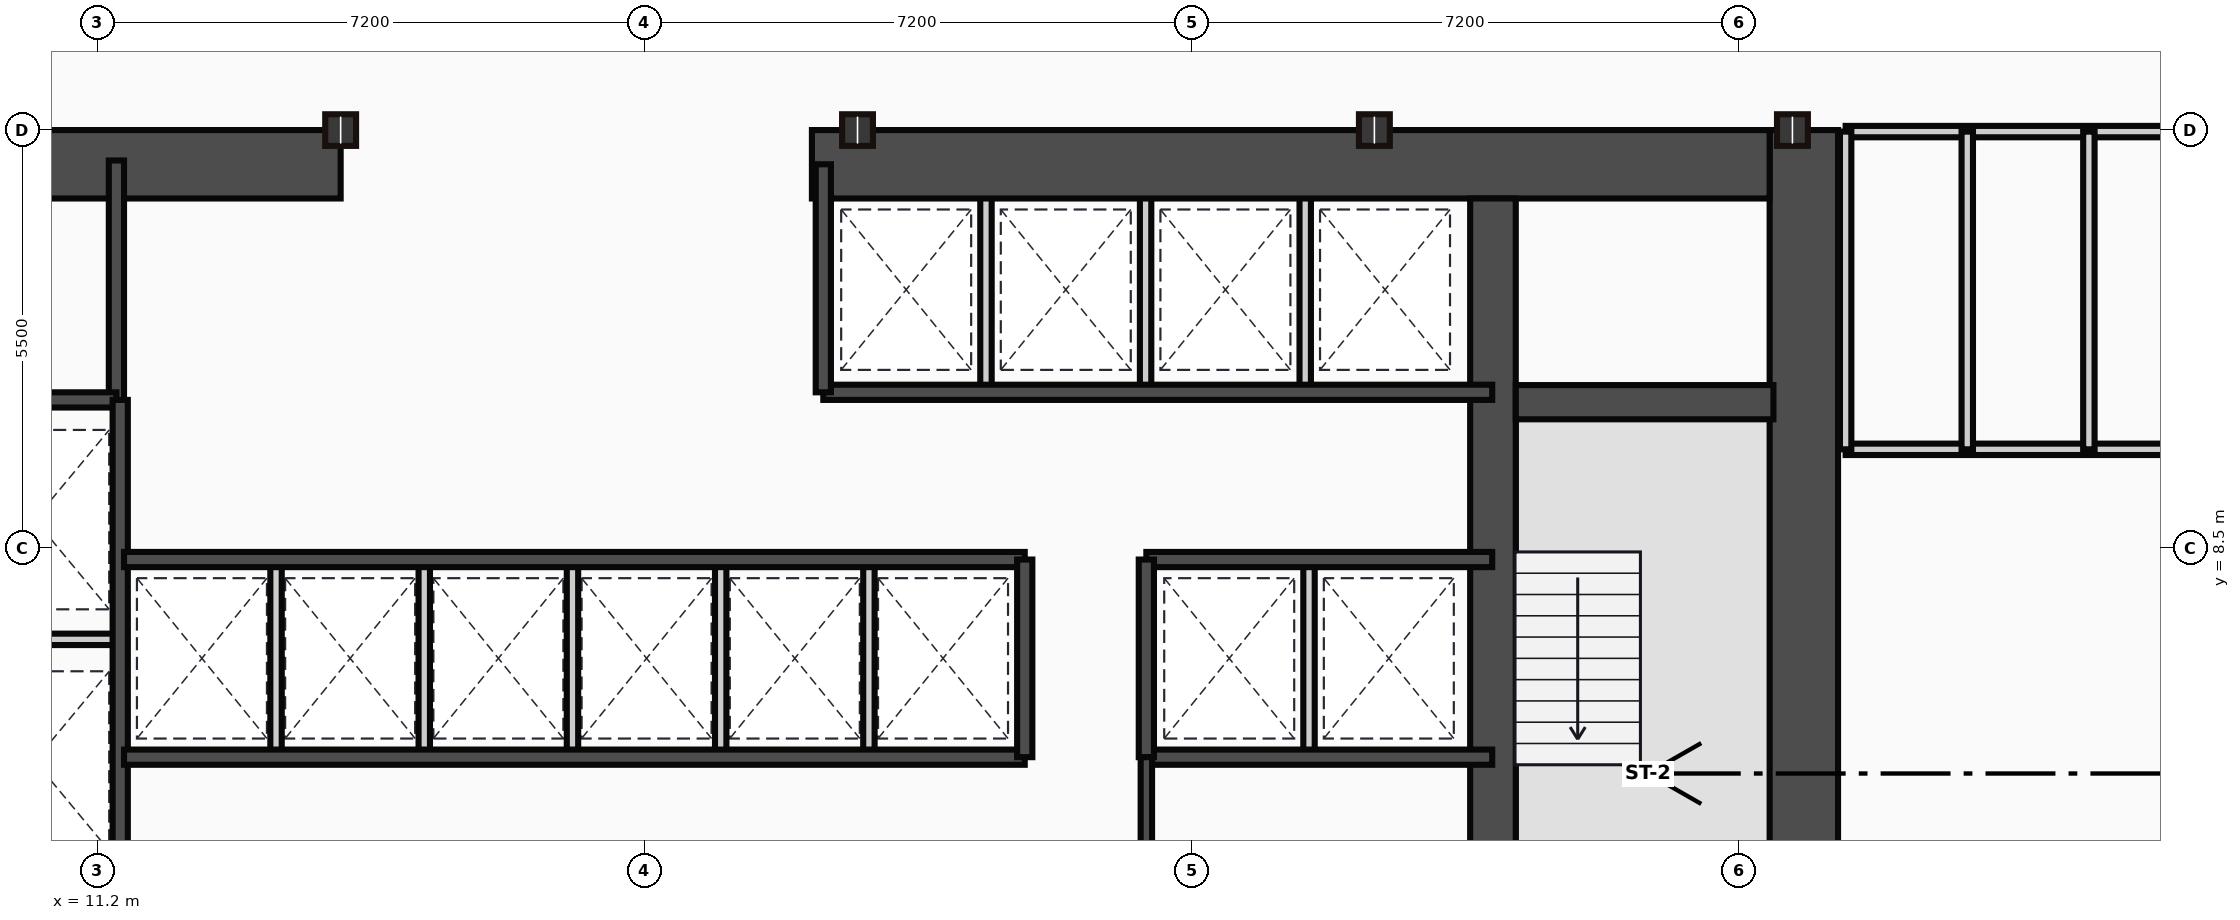
"""IFC4 building model, lengths in metres.
Left out: names, types, materials, properties, quantities, classifications, styles, units other than length and angle.
Written with IfcOpenShell. Run it as: python <this file> out.ifc"""

import sys

from ifc_helpers import new_model, si_unit, direction, frame, frame_2d, origin, origin_2d, place, context, subcontext, project, spatial, rectangle, i_section, extrude, source, transform, mapped, element, fill, save


model = new_model("IFC4")
c1 = context("Model", 3, precision=1e-05, world=origin(), true_north=direction((0.0, 1.0)))
c2 = subcontext(c1, "Body", "Model", "MODEL_VIEW")
j1 = project(units=[si_unit("LENGTHUNIT", "METRE"), si_unit("PLANEANGLEUNIT", "RADIAN")], contexts=[c1])
p1 = place(None, origin())
s1 = spatial("IfcSite", under=j1, at=p1, CompositionType="ELEMENT")
p2 = place(p1, origin())
s2 = spatial("IfcBuilding", under=s1, at=p2, CompositionType="ELEMENT")
p3 = place(p2, frame((0.0, 0.0, 32.5)))
s3 = spatial("IfcBuildingStorey", under=s2, at=p3, CompositionType="ELEMENT", Elevation=32.5)
m1 = source(origin(), c2, "Body", "SweptSolid", [
    extrude(rectangle(XDim=13.1, YDim=0.9, at=frame_2d((6.55, 0.0))), origin(), (0.0, 0.0, 1.0), 3.65),
])
p4 = place(p3, frame((33.65, 0.9, 0.0), z_axis=(0.0, 0.0, 1.0), x_axis=(0.0, 1.0, 0.0)))
e1 = element("IfcWall", 1, at=p4, inside=s3, PredefinedType="SHEAR", context=c2, shape_type="MappedRepresentation", body=[
    mapped(m1, transform((0.0, 0.0, 0.0))),
])
m2 = source(origin(), c2, "Body", "SweptSolid", [
    extrude(rectangle(XDim=9.1, YDim=0.9, at=frame_2d((4.55, 0.0))), origin(), (0.0, 0.0, 1.0), 3.65),
])
p5 = place(p3, frame((5.3, 13.55, 0.0), z_axis=(0.0, 0.0, 1.0), x_axis=(1.0, 0.0, 0.0)))
e2 = element("IfcWall", 2, at=p5, inside=s3, PredefinedType="SHEAR", context=c2, shape_type="MappedRepresentation", body=[
    mapped(m2, transform((0.0, 0.0, 0.0))),
])
p6 = place(p5, frame((4.1, 0.0, 0.0)))
e3 = element("IfcOpeningElement", 3, at=p6, cuts=e2, PredefinedType="OPENING", context=c2, shape_type="SweptSolid", body=[
    extrude(rectangle(XDim=1.1, YDim=2.15, at=frame_2d((0.55, 1.075))), frame((0.0, 0.46, 0.0), z_axis=(0.0, -1.0, 0.0), x_axis=(1.0, 0.0, 0.0)), (0.0, 0.0, 1.0), 0.92),
])
m3 = source(origin(), c2, "Body", "SweptSolid", [
    extrude(rectangle(XDim=12.6, YDim=0.9, at=frame_2d((6.3, 0.0))), origin(), (0.0, 0.0, 1.0), 3.65),
])
p7 = place(p3, frame((20.6, 13.55, 0.0), z_axis=(0.0, 0.0, 1.0), x_axis=(1.0, 0.0, 0.0)))
e4 = element("IfcWall", 4, at=p7, inside=s3, PredefinedType="SHEAR", context=c2, shape_type="MappedRepresentation", body=[
    mapped(m3, transform((0.0, 0.0, 0.0))),
])
p8 = place(p7, frame((9.25, 0.0, 0.0)))
e5 = element("IfcOpeningElement", 5, at=p8, cuts=e4, PredefinedType="OPENING", context=c2, shape_type="SweptSolid", body=[
    extrude(rectangle(XDim=1.1, YDim=2.15, at=frame_2d((0.55, 1.075))), frame((0.0, 0.46, 0.0), z_axis=(0.0, -1.0, 0.0), x_axis=(1.0, 0.0, 0.0)), (0.0, 0.0, 1.0), 0.92),
])
m4 = source(origin(), c2, "Body", "SweptSolid", [
    extrude(rectangle(XDim=12.2, YDim=0.6, at=frame_2d((6.1, 0.0))), origin(), (0.0, 0.0, 1.0), 3.65),
])
p9 = place(p3, frame((29.56, 0.9, 0.0), z_axis=(0.0, 0.0, 1.0), x_axis=(0.0, 1.0, 0.0)))
e6 = element("IfcWall", 6, at=p9, inside=s3, PredefinedType="SHEAR", context=c2, shape_type="MappedRepresentation", body=[
    mapped(m4, transform((0.0, 0.0, 0.0))),
])
m5 = source(origin(), c2, "Body", "SweptSolid", [
    extrude(rectangle(XDim=3.39, YDim=0.45, at=frame_2d((1.695, 0.0))), origin(), (0.0, 0.0, 1.0), 3.65),
])
p10 = place(p3, frame((29.86, 10.42, 0.0), z_axis=(0.0, 0.0, 1.0), x_axis=(1.0, 0.0, 0.0)))
e7 = element("IfcWall", 7, at=p10, inside=s3, PredefinedType="SHEAR", context=c2, shape_type="MappedRepresentation", body=[
    mapped(m5, transform((0.0, 0.0, 0.0))),
])
p11 = place(p10, frame((1.1, 0.0, 0.0)))
e8 = element("IfcOpeningElement", 8, at=p11, cuts=e7, PredefinedType="OPENING", context=c2, shape_type="SweptSolid", body=[
    extrude(rectangle(XDim=1.1, YDim=2.15, at=frame_2d((0.55, 1.075))), frame((0.0, 0.235, 0.0), z_axis=(0.0, -1.0, 0.0), x_axis=(1.0, 0.0, 0.0)), (0.0, 0.0, 1.0), 0.47),
])
m6 = source(origin(), c2, "Body", "SweptSolid", [
    extrude(i_section(OverallWidth=0.406, OverallDepth=0.416, WebThickness=0.03, FlangeThickness=0.048, at=origin_2d()), origin(), (0.0, 0.0, 1.0), 3.65),
])
for number, where, z_axis, x_axis in (
    (9, (14.4, 14.0, 0.0), (0.0, 0.0, 1.0), (1.0, 0.0, 0.0)),
    (10, (21.2, 14.0, 0.0), (0.0, 0.0, 1.0), (1.0, 0.0, 0.0)),
    (11, (28.0, 14.0, 0.0), (0.0, 0.0, 1.0), (1.0, 0.0, 0.0)),
    (12, (33.5, 14.0, 0.0), (0.0, 0.0, 1.0), (1.0, 0.0, 0.0)),
):
    element("IfcColumn", number, at=place(p3, frame(where, z_axis=z_axis, x_axis=x_axis)), inside=s3, PredefinedType="COLUMN", context=c2, shape_type="MappedRepresentation", body=[
        mapped(m6, transform((0.0, 0.0, 0.0))),
    ])
m7 = source(origin(), c2, "Body", "SweptSolid", [
    extrude(rectangle(XDim=3.18, YDim=0.2, at=frame_2d((1.59, 0.0))), origin(), (0.0, 0.0, 1.0), 3.4),
])
p12 = place(p3, frame((11.45, 10.42, 0.0), z_axis=(0.0, 0.0, 1.0), x_axis=(0.0, 1.0, 0.0)))
e13 = element("IfcWall", 13, at=p12, inside=s3, PredefinedType="PARTITIONING", context=c2, shape_type="MappedRepresentation", body=[
    mapped(m7, transform((0.0, 0.0, 0.0))),
])
m8 = source(origin(), c2, "Body", "SweptSolid", [
    extrude(rectangle(XDim=2.35, YDim=0.2, at=frame_2d((1.175, 0.0))), origin(), (0.0, 0.0, 1.0), 3.4),
])
p13 = place(p3, frame((9.1, 10.45, 0.0), z_axis=(0.0, 0.0, 1.0), x_axis=(1.0, 0.0, 0.0)))
e14 = element("IfcWall", 14, at=p13, inside=s3, PredefinedType="PARTITIONING", context=c2, shape_type="MappedRepresentation", body=[
    mapped(m8, transform((0.0, 0.0, 0.0))),
])
p14 = place(p13, frame((0.55, 0.0, 0.0)))
e15 = element("IfcOpeningElement", 15, at=p14, cuts=e14, PredefinedType="OPENING", context=c2, shape_type="SweptSolid", body=[
    extrude(rectangle(XDim=1.1, YDim=2.15, at=frame_2d((0.55, 1.075))), frame((0.0, 0.11, 0.0), z_axis=(0.0, -1.0, 0.0), x_axis=(1.0, 0.0, 0.0)), (0.0, 0.0, 1.0), 0.22),
])
m9 = source(origin(), c2, "Body", "SweptSolid", [
    extrude(rectangle(XDim=9.6, YDim=0.2, at=frame_2d((4.8, 0.0))), origin(), (0.0, 0.0, 1.0), 3.4),
])
p15 = place(p3, frame((11.5, 0.85, 0.0), z_axis=(0.0, 0.0, 1.0), x_axis=(0.0, 1.0, 0.0)))
e16 = element("IfcWall", 16, at=p15, inside=s3, PredefinedType="PARTITIONING", context=c2, shape_type="MappedRepresentation", body=[
    mapped(m9, transform((0.0, 0.0, 0.0))),
])
p16 = place(p15, frame((4.2, 0.0, 0.0)))
e17 = element("IfcOpeningElement", 17, at=p16, cuts=e16, PredefinedType="OPENING", context=c2, shape_type="SweptSolid", body=[
    extrude(rectangle(XDim=1.1, YDim=2.15, at=frame_2d((0.55, 1.075))), frame((0.0, 0.11, 0.0), z_axis=(0.0, -1.0, 0.0), x_axis=(1.0, 0.0, 0.0)), (0.0, 0.0, 1.0), 0.22),
])
p17 = place(p15, frame((0.9, 0.0, 0.0)))
e18 = element("IfcOpeningElement", 18, at=p17, cuts=e16, PredefinedType="OPENING", context=c2, shape_type="SweptSolid", body=[
    extrude(rectangle(XDim=1.2, YDim=2.15, at=frame_2d((0.6, 1.075))), frame((0.0, 0.11, 0.0), z_axis=(0.0, -1.0, 0.0), x_axis=(1.0, 0.0, 0.0)), (0.0, 0.0, 1.0), 0.22),
])
m10 = source(origin(), c2, "Body", "SweptSolid", [
    extrude(rectangle(XDim=2.4, YDim=0.15, at=frame_2d((1.2, 0.0))), origin(), (0.0, 0.0, 1.0), 3.4),
])
p18 = place(p3, frame((9.1, 7.3, 0.0), z_axis=(0.0, 0.0, 1.0), x_axis=(1.0, 0.0, 0.0)))
e19 = element("IfcWall", 19, at=p18, inside=s3, PredefinedType="PARTITIONING", context=c2, shape_type="MappedRepresentation", body=[
    mapped(m10, transform((0.0, 0.0, 0.0))),
])
m11 = source(origin(), c2, "Body", "SweptSolid", [
    extrude(rectangle(XDim=11.85, YDim=0.2, at=frame_2d((5.925, 0.0))), origin(), (0.0, 0.0, 1.0), 3.4),
])
for number, where, z_axis, x_axis in (
    (20, (11.55, 5.75, 0.0), (0.0, 0.0, 1.0), (1.0, 0.0, 0.0)),
    (21, (11.55, 8.35, 0.0), (0.0, 0.0, 1.0), (1.0, 0.0, 0.0)),
):
    element("IfcWall", number, at=place(p3, frame(where, z_axis=z_axis, x_axis=x_axis)), inside=s3, PredefinedType="PARTITIONING", context=c2, shape_type="MappedRepresentation", body=[
        mapped(m11, transform((0.0, 0.0, 0.0))),
    ])
m12 = source(origin(), c2, "Body", "SweptSolid", [
    extrude(rectangle(XDim=2.6, YDim=0.2, at=frame_2d((1.3, 0.0))), origin(), (0.0, 0.0, 1.0), 3.4),
])
p19 = place(p3, frame((23.4, 5.75, 0.0), z_axis=(0.0, 0.0, 1.0), x_axis=(0.0, 1.0, 0.0)))
e22 = element("IfcWall", 22, at=p19, inside=s3, PredefinedType="PARTITIONING", context=c2, shape_type="MappedRepresentation", body=[
    mapped(m12, transform((0.0, 0.0, 0.0))),
])
m13 = source(origin(), c2, "Body", "SweptSolid", [
    extrude(rectangle(XDim=2.5, YDim=0.15, at=frame_2d((1.25, 0.0))), origin(), (0.0, 0.0, 1.0), 3.4),
])
for number, where, z_axis, x_axis in (
    (23, (13.55, 5.8, 0.0), (0.0, 0.0, 1.0), (0.0, 1.0, 0.0)),
    (24, (15.5, 5.8, 0.0), (0.0, 0.0, 1.0), (0.0, 1.0, 0.0)),
    (25, (17.45, 5.8, 0.0), (0.0, 0.0, 1.0), (0.0, 1.0, 0.0)),
    (26, (19.4, 5.8, 0.0), (0.0, 0.0, 1.0), (0.0, 1.0, 0.0)),
    (27, (21.35, 5.8, 0.0), (0.0, 0.0, 1.0), (0.0, 1.0, 0.0)),
):
    element("IfcWall", number, at=place(p3, frame(where, z_axis=z_axis, x_axis=x_axis)), inside=s3, PredefinedType="PARTITIONING", context=c2, shape_type="MappedRepresentation", body=[
        mapped(m13, transform((0.0, 0.0, 0.0))),
    ])
m14 = source(origin(), c2, "Body", "SweptSolid", [
    extrude(rectangle(XDim=8.8, YDim=0.2, at=frame_2d((4.4, 0.0))), origin(), (0.0, 0.0, 1.0), 3.4),
])
p20 = place(p3, frame((20.75, 10.55, 0.0), z_axis=(0.0, 0.0, 1.0), x_axis=(1.0, 0.0, 0.0)))
e28 = element("IfcWall", 28, at=p20, inside=s3, PredefinedType="PARTITIONING", context=c2, shape_type="MappedRepresentation", body=[
    mapped(m14, transform((0.0, 0.0, 0.0))),
])
m15 = source(origin(), c2, "Body", "SweptSolid", [
    extrude(rectangle(XDim=3.0, YDim=0.2, at=frame_2d((1.5, 0.0))), origin(), (0.0, 0.0, 1.0), 3.4),
])
p21 = place(p3, frame((20.75, 10.55, 0.0), z_axis=(0.0, 0.0, 1.0), x_axis=(0.0, 1.0, 0.0)))
e29 = element("IfcWall", 29, at=p21, inside=s3, PredefinedType="PARTITIONING", context=c2, shape_type="MappedRepresentation", body=[
    mapped(m15, transform((0.0, 0.0, 0.0))),
])
m16 = source(origin(), c2, "Body", "SweptSolid", [
    extrude(rectangle(XDim=2.85, YDim=0.15, at=frame_2d((1.425, 0.0))), origin(), (0.0, 0.0, 1.0), 3.4),
])
for number, where, z_axis, x_axis in (
    (30, (22.89, 10.6, 0.0), (0.0, 0.0, 1.0), (0.0, 1.0, 0.0)),
    (31, (24.99, 10.6, 0.0), (0.0, 0.0, 1.0), (0.0, 1.0, 0.0)),
    (32, (27.09, 10.6, 0.0), (0.0, 0.0, 1.0), (0.0, 1.0, 0.0)),
):
    element("IfcWall", number, at=place(p3, frame(where, z_axis=z_axis, x_axis=x_axis)), inside=s3, PredefinedType="PARTITIONING", context=c2, shape_type="MappedRepresentation", body=[
        mapped(m16, transform((0.0, 0.0, 0.0))),
    ])
m17 = source(origin(), c2, "Body", "SweptSolid", [
    extrude(rectangle(XDim=4.55, YDim=0.2, at=frame_2d((2.275, 0.0))), origin(), (0.0, 0.0, 1.0), 3.4),
])
for number, where, z_axis, x_axis in (
    (33, (25.0, 8.35, 0.0), (0.0, 0.0, 1.0), (1.0, 0.0, 0.0)),
    (34, (25.0, 5.75, 0.0), (0.0, 0.0, 1.0), (1.0, 0.0, 0.0)),
):
    element("IfcWall", number, at=place(p3, frame(where, z_axis=z_axis, x_axis=x_axis)), inside=s3, PredefinedType="PARTITIONING", context=c2, shape_type="MappedRepresentation", body=[
        mapped(m17, transform((0.0, 0.0, 0.0))),
    ])
p22 = place(p3, frame((25.0, 5.75, 0.0), z_axis=(0.0, 0.0, 1.0), x_axis=(0.0, 1.0, 0.0)))
e35 = element("IfcWall", 35, at=p22, inside=s3, PredefinedType="PARTITIONING", context=c2, shape_type="MappedRepresentation", body=[
    mapped(m12, transform((0.0, 0.0, 0.0))),
])
p23 = place(p3, frame((27.14, 5.8, 0.0), z_axis=(0.0, 0.0, 1.0), x_axis=(0.0, 1.0, 0.0)))
e36 = element("IfcWall", 36, at=p23, inside=s3, PredefinedType="PARTITIONING", context=c2, shape_type="MappedRepresentation", body=[
    mapped(m13, transform((0.0, 0.0, 0.0))),
])
m18 = source(origin(), c2, "Body", "SweptSolid", [
    extrude(rectangle(XDim=4.9, YDim=0.15, at=frame_2d((2.45, 0.0))), origin(), (0.0, 0.0, 1.0), 3.4),
])
p24 = place(p3, frame((25.0, 0.85, 0.0), z_axis=(0.0, 0.0, 1.0), x_axis=(0.0, 1.0, 0.0)))
e37 = element("IfcWall", 37, at=p24, inside=s3, PredefinedType="PARTITIONING", context=c2, shape_type="MappedRepresentation", body=[
    mapped(m18, transform((0.0, 0.0, 0.0))),
])
p25 = place(p24, frame((1.8, 0.0, 0.0)))
e38 = element("IfcOpeningElement", 38, at=p25, cuts=e37, PredefinedType="OPENING", context=c2, shape_type="SweptSolid", body=[
    extrude(rectangle(XDim=0.95, YDim=2.15, at=frame_2d((0.475, 1.075))), frame((0.0, 0.085, 0.0), z_axis=(0.0, -1.0, 0.0), x_axis=(1.0, 0.0, 0.0)), (0.0, 0.0, 1.0), 0.17),
])
p26 = place(p24, frame((3.45, 0.0, 0.0)))
e39 = element("IfcOpeningElement", 39, at=p26, cuts=e37, PredefinedType="OPENING", context=c2, shape_type="SweptSolid", body=[
    extrude(rectangle(XDim=0.95, YDim=2.15, at=frame_2d((0.475, 1.075))), frame((0.0, 0.085, 0.0), z_axis=(0.0, -1.0, 0.0), x_axis=(1.0, 0.0, 0.0)), (0.0, 0.0, 1.0), 0.17),
])
m19 = source(origin(), c2, "Body", "SweptSolid", [
    extrude(rectangle(XDim=4.8, YDim=0.15, at=frame_2d((2.4, 0.0))), origin(), (0.0, 0.0, 1.0), 2.625),
])
p27 = place(p3, frame((34.2, 13.98, 0.0), z_axis=(0.0, 0.0, 1.0), x_axis=(1.0, 0.0, 0.0)))
e40 = element("IfcWall", 40, at=p27, inside=s3, PredefinedType="PARTITIONING", context=c2, shape_type="MappedRepresentation", body=[
    mapped(m19, transform((0.0, 0.0, 0.0))),
])
p28 = place(p27, frame((0.35, 0.0, 0.0)))
e41 = element("IfcOpeningElement", 41, at=p28, cuts=e40, PredefinedType="OPENING", context=c2, shape_type="SweptSolid", body=[
    extrude(rectangle(XDim=0.85, YDim=2.1, at=frame_2d((0.425, 1.05))), frame((0.0, 0.085, 0.0), z_axis=(0.0, -1.0, 0.0), x_axis=(1.0, 0.0, 0.0)), (0.0, 0.0, 1.0), 0.17),
])
p29 = place(p27, frame((1.95, 0.0, 0.0)))
e42 = element("IfcOpeningElement", 42, at=p29, cuts=e40, PredefinedType="OPENING", context=c2, shape_type="SweptSolid", body=[
    extrude(rectangle(XDim=0.85, YDim=2.1, at=frame_2d((0.425, 1.05))), frame((0.0, 0.085, 0.0), z_axis=(0.0, -1.0, 0.0), x_axis=(1.0, 0.0, 0.0)), (0.0, 0.0, 1.0), 0.17),
])
p30 = place(p27, frame((3.5, 0.0, 0.0)))
e43 = element("IfcOpeningElement", 43, at=p30, cuts=e40, PredefinedType="OPENING", context=c2, shape_type="SweptSolid", body=[
    extrude(rectangle(XDim=0.9, YDim=2.1, at=frame_2d((0.45, 1.05))), frame((0.0, 0.085, 0.0), z_axis=(0.0, -1.0, 0.0), x_axis=(1.0, 0.0, 0.0)), (0.0, 0.0, 1.0), 0.17),
])
m20 = source(origin(), c2, "Body", "SweptSolid", [
    extrude(rectangle(XDim=4.8, YDim=0.15, at=frame_2d((2.4, 0.0))), origin(), (0.0, 0.0, 1.0), 3.4),
])
p31 = place(p3, frame((34.2, 9.8, 0.0), z_axis=(0.0, 0.0, 1.0), x_axis=(1.0, 0.0, 0.0)))
e44 = element("IfcWall", 44, at=p31, inside=s3, PredefinedType="PARTITIONING", context=c2, shape_type="MappedRepresentation", body=[
    mapped(m20, transform((0.0, 0.0, 0.0))),
])
m21 = source(origin(), c2, "Body", "SweptSolid", [
    extrude(rectangle(XDim=4.18, YDim=0.15, at=frame_2d((2.09, 0.0))), origin(), (0.0, 0.0, 1.0), 3.4),
])
for number, where, z_axis, x_axis in (
    (45, (34.2, 9.8, 0.0), (0.0, 0.0, 1.0), (0.0, 1.0, 0.0)),
    (46, (35.8, 9.8, 0.0), (0.0, 0.0, 1.0), (0.0, 1.0, 0.0)),
    (47, (37.4, 9.8, 0.0), (0.0, 0.0, 1.0), (0.0, 1.0, 0.0)),
):
    element("IfcWall", number, at=place(p3, frame(where, z_axis=z_axis, x_axis=x_axis)), inside=s3, PredefinedType="PARTITIONING", context=c2, shape_type="MappedRepresentation", body=[
        mapped(m21, transform((0.0, 0.0, 0.0))),
    ])
m22 = source(origin(), c2, "Body", "SweptSolid", [
    extrude(rectangle(XDim=1.1, YDim=2.15, at=frame_2d((0.55, 1.075))), frame((0.0, 0.025, 0.0), z_axis=(0.0, -1.0, 0.0), x_axis=(1.0, 0.0, 0.0)), (0.0, 0.0, 1.0), 0.05),
])
p32 = place(p11, frame((1.1, 0.0, 0.0), z_axis=(0.0, 0.0, 1.0), x_axis=(-1.0, 0.0, 0.0)))
e48 = element("IfcDoor", 48, at=p32, inside=s3, OperationType="SINGLE_SWING_RIGHT", PredefinedType="DOOR", context=c2, shape_type="MappedRepresentation", body=[
    mapped(m22, transform((0.0, 0.0, 0.0))),
])
fill(e8, e48)
p33 = place(p8, origin())
e49 = element("IfcDoor", 49, at=p33, inside=s3, OperationType="SINGLE_SWING_LEFT", PredefinedType="DOOR", context=c2, shape_type="MappedRepresentation", body=[
    mapped(m22, transform((0.0, 0.0, 0.0))),
])
fill(e5, e49)
p34 = place(p14, origin())
e50 = element("IfcDoor", 50, at=p34, inside=s3, OperationType="SLIDING_TO_LEFT", PredefinedType="DOOR", context=c2, shape_type="MappedRepresentation", body=[
    mapped(m22, transform((0.0, 0.0, 0.0))),
])
fill(e15, e50)
p35 = place(p16, frame((1.1, 0.0, 0.0), z_axis=(0.0, 0.0, 1.0), x_axis=(-1.0, 0.0, 0.0)))
e51 = element("IfcDoor", 51, at=p35, inside=s3, OperationType="SLIDING_TO_LEFT", PredefinedType="DOOR", context=c2, shape_type="MappedRepresentation", body=[
    mapped(m22, transform((0.0, 0.0, 0.0))),
])
fill(e17, e51)
m23 = source(origin(), c2, "Body", "SweptSolid", [
    extrude(rectangle(XDim=0.95, YDim=2.15, at=frame_2d((0.475, 1.075))), frame((0.0, 0.025, 0.0), z_axis=(0.0, -1.0, 0.0), x_axis=(1.0, 0.0, 0.0)), (0.0, 0.0, 1.0), 0.05),
])
p36 = place(p26, origin())
e52 = element("IfcDoor", 52, at=p36, inside=s3, OperationType="SINGLE_SWING_RIGHT", PredefinedType="DOOR", context=c2, shape_type="MappedRepresentation", body=[
    mapped(m23, transform((0.0, 0.0, 0.0))),
])
fill(e39, e52)
m24 = source(origin(), c2, "Body", "SweptSolid", [
    extrude(rectangle(XDim=0.85, YDim=2.1, at=frame_2d((0.425, 1.05))), frame((0.0, 0.025, 0.0), z_axis=(0.0, -1.0, 0.0), x_axis=(1.0, 0.0, 0.0)), (0.0, 0.0, 1.0), 0.05),
])
p37 = place(p28, frame((0.85, 0.0, 0.0), z_axis=(0.0, 0.0, 1.0), x_axis=(-1.0, 0.0, 0.0)))
e53 = element("IfcDoor", 53, at=p37, inside=s3, OperationType="SINGLE_SWING_LEFT", PredefinedType="DOOR", context=c2, shape_type="MappedRepresentation", body=[
    mapped(m24, transform((0.0, 0.0, 0.0))),
])
fill(e41, e53)
p38 = place(p29, frame((0.85, 0.0, 0.0), z_axis=(0.0, 0.0, 1.0), x_axis=(-1.0, 0.0, 0.0)))
e54 = element("IfcDoor", 54, at=p38, inside=s3, OperationType="SINGLE_SWING_RIGHT", PredefinedType="DOOR", context=c2, shape_type="MappedRepresentation", body=[
    mapped(m24, transform((0.0, 0.0, 0.0))),
])
fill(e42, e54)
m25 = source(origin(), c2, "Body", "SweptSolid", [
    extrude(rectangle(XDim=0.9, YDim=2.1, at=frame_2d((0.45, 1.05))), frame((0.0, 0.025, 0.0), z_axis=(0.0, -1.0, 0.0), x_axis=(1.0, 0.0, 0.0)), (0.0, 0.0, 1.0), 0.05),
])
p39 = place(p30, frame((0.9, 0.0, 0.0), z_axis=(0.0, 0.0, 1.0), x_axis=(-1.0, 0.0, 0.0)))
e55 = element("IfcDoor", 55, at=p39, inside=s3, OperationType="SINGLE_SWING_LEFT", PredefinedType="DOOR", context=c2, shape_type="MappedRepresentation", body=[
    mapped(m25, transform((0.0, 0.0, 0.0))),
])
fill(e43, e55)
save(model, sys.argv[1])
